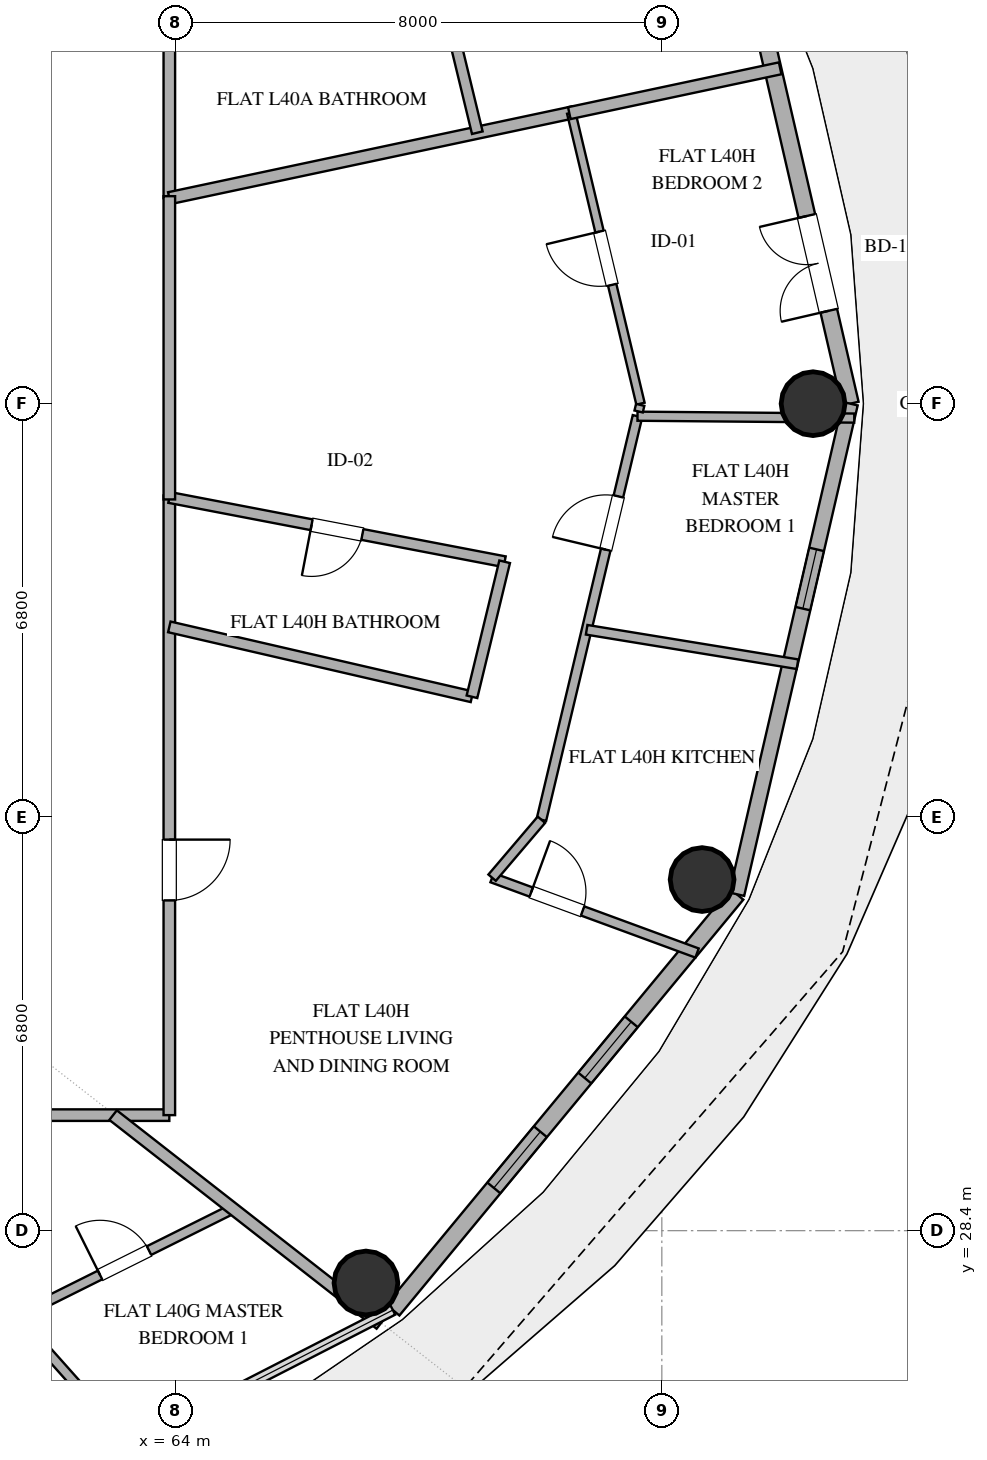
"""IFC4 building model, lengths in metres.
Left out: names, types, materials, properties, quantities, classifications, styles, units other than length and angle.
Written with IfcOpenShell. Run it as: python <this file> out.ifc"""

import sys

from ifc_helpers import new_model, si_unit, direction, frame, frame_2d, origin, origin_2d, place, context, subcontext, project, spatial, rectangle, hollow_circle, extrude, element, fill, save


model = new_model("IFC4")
c1 = context("Model", 3, precision=1e-05, world=origin(), true_north=direction((0.0, 1.0)))
c2 = subcontext(c1, "Body", "Model", "MODEL_VIEW")
j1 = project(units=[si_unit("LENGTHUNIT", "METRE"), si_unit("PLANEANGLEUNIT", "RADIAN")], contexts=[c1])
p1 = place(None, origin())
s1 = spatial("IfcSite", under=j1, at=p1, CompositionType="ELEMENT")
p2 = place(p1, origin())
s2 = spatial("IfcBuilding", under=s1, at=p2, CompositionType="ELEMENT")
p3 = place(p2, frame((0.0, 0.0, 161.4)))
s3 = spatial("IfcBuildingStorey", under=s2, at=p3, CompositionType="ELEMENT", Elevation=161.4)
for number, where, z_axis, x_axis in (
    (1, (74.487, 42.0, 0.0), (0.0, 0.0, 1.0), (1.0, 0.0, 0.0)),
    (2, (67.134, 27.54, 0.0), (0.0, 0.0, 1.0), (1.0, 0.0, 0.0)),
    (3, (72.662, 34.174, 0.0), (0.0, 0.0, 1.0), (1.0, 0.0, 0.0)),
):
    element("IfcColumn", number, at=place(p3, frame(where, z_axis=z_axis, x_axis=x_axis)), inside=s3, PredefinedType="COLUMN", context=c2, shape_type="SweptSolid", body=[
        extrude(hollow_circle(Radius=0.525, WallThickness=0.028, at=origin_2d()), origin(), (0.0, 0.0, 1.0), 3.38),
    ])
p4 = place(p3, frame((75.099, 42.0, 0.0), z_axis=(0.0, 0.0, 1.0), x_axis=(-0.225473184558, 0.974249374157, 0.0)))
e4 = element("IfcWall", 4, at=p4, inside=s3, PredefinedType="SOLIDWALL", context=c2, shape_type="SweptSolid", body=[
    extrude(rectangle(XDim=8.28, YDim=0.28, at=frame_2d((4.14, 0.0))), origin(), (0.0, 0.0, 1.0), 3.38),
])
p5 = place(p4, frame((1.568, 0.0, 0.0)))
e5 = element("IfcOpeningElement", 5, at=p5, cuts=e4, PredefinedType="OPENING", context=c2, shape_type="SweptSolid", body=[
    extrude(rectangle(XDim=1.6, YDim=2.25, at=frame_2d((0.8, 1.125))), frame((0.0, 0.15, 0.0), z_axis=(0.0, -1.0, 0.0), x_axis=(1.0, 0.0, 0.0)), (0.0, 0.0, 1.0), 0.3),
])
p6 = place(p3, frame((67.576, 27.094, 0.0), z_axis=(0.0, 0.0, 1.0), x_axis=(0.637333477683, 0.770588111915, 0.0)))
e6 = element("IfcWall", 6, at=p6, inside=s3, PredefinedType="SOLIDWALL", context=c2, shape_type="SweptSolid", body=[
    extrude(rectangle(XDim=8.875, YDim=0.28, at=frame_2d((4.438, 0.0))), origin(), (0.0, 0.0, 1.0), 3.38),
])
p7 = place(p6, frame((2.607, 0.0, 0.85)))
e7 = element("IfcOpeningElement", 7, at=p7, cuts=e6, PredefinedType="OPENING", context=c2, shape_type="SweptSolid", body=[
    extrude(rectangle(XDim=1.2, YDim=1.6, at=frame_2d((0.6, 0.8))), frame((0.0, 0.15, 0.0), z_axis=(0.0, -1.0, 0.0), x_axis=(1.0, 0.0, 0.0)), (0.0, 0.0, 1.0), 0.3),
])
p8 = place(p6, frame((4.952, 0.0, 0.85)))
e8 = element("IfcOpeningElement", 8, at=p8, cuts=e6, PredefinedType="OPENING", context=c2, shape_type="SweptSolid", body=[
    extrude(rectangle(XDim=1.2, YDim=1.6, at=frame_2d((0.6, 0.8))), frame((0.0, 0.15, 0.0), z_axis=(0.0, -1.0, 0.0), x_axis=(1.0, 0.0, 0.0)), (0.0, 0.0, 1.0), 0.3),
])
p9 = place(p3, frame((73.232, 33.933, 0.0), z_axis=(0.0, 0.0, 1.0), x_axis=(0.225473184558, 0.974249374157, 0.0)))
e9 = element("IfcWall", 9, at=p9, inside=s3, PredefinedType="SOLIDWALL", context=c2, shape_type="SweptSolid", body=[
    extrude(rectangle(XDim=8.28, YDim=0.25, at=frame_2d((4.14, 0.0))), origin(), (0.0, 0.0, 1.0), 3.38),
])
p10 = place(p9, frame((4.821, 0.0, 0.35)))
e10 = element("IfcOpeningElement", 10, at=p10, cuts=e9, PredefinedType="OPENING", context=c2, shape_type="SweptSolid", body=[
    extrude(rectangle(XDim=1.0, YDim=1.05, at=frame_2d((0.5, 0.525))), frame((0.0, 0.135, 0.0), z_axis=(0.0, -1.0, 0.0), x_axis=(1.0, 0.0, 0.0)), (0.0, 0.0, 1.0), 0.27),
])
p11 = place(p3, frame((63.9, 30.3, 0.0), z_axis=(0.0, 0.0, 1.0), x_axis=(-1.0, 0.0, 0.0)))
e11 = element("IfcWall", 11, at=p11, inside=s3, PredefinedType="PARTITIONING", context=c2, shape_type="SweptSolid", body=[
    extrude(rectangle(XDim=15.625, YDim=0.19, at=frame_2d((7.813, 0.0))), origin(), (0.0, 0.0, 1.0), 2.74),
])
p12 = place(p11, frame((6.137, 0.0, 0.0)))
e12 = element("IfcOpeningElement", 12, at=p12, cuts=e11, PredefinedType="OPENING", context=c2, shape_type="SweptSolid", body=[
    extrude(rectangle(XDim=1.0, YDim=2.2, at=frame_2d((0.5, 1.1))), frame((0.0, 0.105, 0.0), z_axis=(0.0, -1.0, 0.0), x_axis=(1.0, 0.0, 0.0)), (0.0, 0.0, 1.0), 0.21),
])
p13 = place(p3, frame((63.9, 40.49, 0.0), z_axis=(0.0, 0.0, 1.0), x_axis=(0.0, -1.0, 0.0)))
e13 = element("IfcWall", 13, at=p13, inside=s3, PredefinedType="PARTITIONING", context=c2, shape_type="SweptSolid", body=[
    extrude(rectangle(XDim=10.19, YDim=0.19, at=frame_2d((5.095, 0.0))), origin(), (0.0, 0.0, 1.0), 2.74),
])
p14 = place(p13, frame((5.659, 0.0, 0.0)))
e14 = element("IfcOpeningElement", 14, at=p14, cuts=e13, PredefinedType="OPENING", context=c2, shape_type="SweptSolid", body=[
    extrude(rectangle(XDim=1.0, YDim=2.2, at=frame_2d((0.5, 1.1))), frame((0.0, 0.105, 0.0), z_axis=(0.0, -1.0, 0.0), x_axis=(1.0, 0.0, 0.0)), (0.0, 0.0, 1.0), 0.21),
])
p15 = place(p3, frame((69.415, 39.4, 0.0), z_axis=(0.0, 0.0, 1.0), x_axis=(-0.98210492306, 0.188334596135, 0.0)))
e15 = element("IfcWall", 15, at=p15, inside=s3, PredefinedType="PLUMBINGWALL", context=c2, shape_type="SweptSolid", body=[
    extrude(rectangle(XDim=5.616, YDim=0.18, at=frame_2d((2.808, 0.0))), origin(), (0.0, 0.0, 1.0), 2.74),
])
p16 = place(p15, frame((2.383, 0.0, 0.0)))
e16 = element("IfcOpeningElement", 16, at=p16, cuts=e15, PredefinedType="OPENING", context=c2, shape_type="SweptSolid", body=[
    extrude(rectangle(XDim=0.85, YDim=2.1, at=frame_2d((0.425, 1.05))), frame((0.0, 0.1, 0.0), z_axis=(0.0, -1.0, 0.0), x_axis=(1.0, 0.0, 0.0)), (0.0, 0.0, 1.0), 0.2),
])
p17 = place(p3, frame((63.9, 53.7, 0.0), z_axis=(0.0, 0.0, 1.0), x_axis=(0.0, -1.0, 0.0)))
e17 = element("IfcWall", 17, at=p17, inside=s3, PredefinedType="PARTITIONING", context=c2, shape_type="SweptSolid", body=[
    extrude(rectangle(XDim=8.32, YDim=0.19, at=frame_2d((4.16, 0.0))), origin(), (0.0, 0.0, 1.0), 2.74),
])
p18 = place(p3, frame((63.9, 45.38, 0.0), z_axis=(0.0, 0.0, 1.0), x_axis=(0.978145779981, 0.207920256603, 0.0)))
e18 = element("IfcWall", 18, at=p18, inside=s3, PredefinedType="PARTITIONING", context=c2, shape_type="SweptSolid", body=[
    extrude(rectangle(XDim=6.789, YDim=0.2, at=frame_2d((3.395, 0.0))), origin(), (0.0, 0.0, 1.0), 2.74),
])
p19 = place(p3, frame((63.9, 38.329, 0.0), z_axis=(0.0, 0.0, 1.0), x_axis=(0.974377500084, -0.224918846098, 0.0)))
e19 = element("IfcWall", 19, at=p19, inside=s3, PredefinedType="PLUMBINGWALL", context=c2, shape_type="SweptSolid", body=[
    extrude(rectangle(XDim=5.108, YDim=0.18, at=frame_2d((2.554, 0.0))), origin(), (0.0, 0.0, 1.0), 2.74),
])
p20 = place(p3, frame((63.9, 45.412, 0.0), z_axis=(0.0, 0.0, 1.0), x_axis=(0.0, -1.0, 0.0)))
e20 = element("IfcWall", 20, at=p20, inside=s3, PredefinedType="PARTITIONING", context=c2, shape_type="SweptSolid", body=[
    extrude(rectangle(XDim=4.987, YDim=0.19, at=frame_2d((2.494, 0.0))), origin(), (0.0, 0.0, 1.0), 2.74),
])
p21 = place(p3, frame((71.649, 42.0, 0.0), z_axis=(0.0, 0.0, 1.0), x_axis=(-0.231622764326, 0.972805682059, 0.0)))
e21 = element("IfcWall", 21, at=p21, inside=s3, PredefinedType="PARTITIONING", context=c2, shape_type="SweptSolid", body=[
    extrude(rectangle(XDim=4.918, YDim=0.14, at=frame_2d((2.459, 0.0))), origin(), (0.0, 0.0, 1.0), 2.74),
])
p22 = place(p21, frame((2.009, 0.0, 0.0)))
e22 = element("IfcOpeningElement", 22, at=p22, cuts=e21, PredefinedType="OPENING", context=c2, shape_type="SweptSolid", body=[
    extrude(rectangle(XDim=0.9, YDim=2.1, at=frame_2d((0.45, 1.05))), frame((0.0, 0.08, 0.0), z_axis=(0.0, -1.0, 0.0), x_axis=(1.0, 0.0, 0.0)), (0.0, 0.0, 1.0), 0.16),
])
p23 = place(p3, frame((60.713, 26.65, 0.0), z_axis=(0.0, 0.0, 1.0), x_axis=(0.894932492822, 0.446201561283, 0.0)))
e23 = element("IfcWall", 23, at=p23, inside=s3, PredefinedType="PLUMBINGWALL", context=c2, shape_type="SweptSolid", body=[
    extrude(rectangle(XDim=4.729, YDim=0.16, at=frame_2d((2.365, 0.0))), origin(), (0.0, 0.0, 1.0), 2.74),
])
p24 = place(p23, frame((2.288, 0.0, 0.0)))
e24 = element("IfcOpeningElement", 24, at=p24, cuts=e23, PredefinedType="OPENING", context=c2, shape_type="SweptSolid", body=[
    extrude(rectangle(XDim=0.9, YDim=2.1, at=frame_2d((0.45, 1.05))), frame((0.0, 0.09, 0.0), z_axis=(0.0, -1.0, 0.0), x_axis=(1.0, 0.0, 0.0)), (0.0, 0.0, 1.0), 0.18),
])
p25 = place(p3, frame((70.019, 35.158, 0.0), z_axis=(0.0, 0.0, 1.0), x_axis=(0.231657621012, 0.972797382103, 0.0)))
e25 = element("IfcWall", 25, at=p25, inside=s3, PredefinedType="PLUMBINGWALL", context=c2, shape_type="SweptSolid", body=[
    extrude(rectangle(XDim=6.822, YDim=0.16, at=frame_2d((3.411, 0.0))), origin(), (0.0, 0.0, 1.0), 2.74),
])
p26 = place(p25, frame((4.567, 0.0, 0.0)))
e26 = element("IfcOpeningElement", 26, at=p26, cuts=e25, PredefinedType="OPENING", context=c2, shape_type="SweptSolid", body=[
    extrude(rectangle(XDim=0.9, YDim=2.1, at=frame_2d((0.45, 1.05))), frame((0.0, 0.09, 0.0), z_axis=(0.0, -1.0, 0.0), x_axis=(1.0, 0.0, 0.0)), (0.0, 0.0, 1.0), 0.18),
])
p27 = place(p3, frame((69.208, 34.205, 0.0), z_axis=(0.0, 0.0, 1.0), x_axis=(0.938602834346, -0.344999593272, 0.0)))
e27 = element("IfcWall", 27, at=p27, inside=s3, PredefinedType="PLUMBINGWALL", context=c2, shape_type="SweptSolid", body=[
    extrude(rectangle(XDim=3.591, YDim=0.16, at=frame_2d((1.796, 0.0))), origin(), (0.0, 0.0, 1.0), 2.74),
])
p28 = place(p27, frame((0.686, 0.0, 0.0)))
e28 = element("IfcOpeningElement", 28, at=p28, cuts=e27, PredefinedType="OPENING", context=c2, shape_type="SweptSolid", body=[
    extrude(rectangle(XDim=0.9, YDim=2.1, at=frame_2d((0.45, 1.05))), frame((0.0, 0.09, 0.0), z_axis=(0.0, -1.0, 0.0), x_axis=(1.0, 0.0, 0.0)), (0.0, 0.0, 1.0), 0.18),
])
p29 = place(p3, frame((75.165, 41.763, 0.0), z_axis=(0.0, 0.0, 1.0), x_axis=(-0.999962184605, 0.00869651424, 0.0)))
e29 = element("IfcWall", 29, at=p29, inside=s3, PredefinedType="PARTITIONING", context=c2, shape_type="SweptSolid", body=[
    extrude(rectangle(XDim=3.565, YDim=0.15, at=frame_2d((1.783, 0.0))), origin(), (0.0, 0.0, 1.0), 2.74),
])
p30 = place(p3, frame((73.946, 47.515, 0.0), z_axis=(0.0, 0.0, 1.0), x_axis=(-0.978135742848, -0.207967469966, 0.0)))
e30 = element("IfcWall", 30, at=p30, inside=s3, PredefinedType="PARTITIONING", context=c2, shape_type="SweptSolid", body=[
    extrude(rectangle(XDim=3.545, YDim=0.2, at=frame_2d((1.773, 0.0))), origin(), (0.0, 0.0, 1.0), 2.74),
])
p31 = place(p3, frame((74.231, 37.716, 0.0), z_axis=(0.0, 0.0, 1.0), x_axis=(-0.986918442879, 0.161220306117, 0.0)))
e31 = element("IfcWall", 31, at=p31, inside=s3, PredefinedType="PLUMBINGWALL", context=c2, shape_type="SweptSolid", body=[
    extrude(rectangle(XDim=3.513, YDim=0.16, at=frame_2d((1.757, 0.0))), origin(), (0.0, 0.0, 1.0), 2.74),
])
p32 = place(p3, frame((67.37, 26.866, 0.0), z_axis=(0.0, 0.0, 1.0), x_axis=(-0.788004464355, 0.615669525117, 0.0)))
e32 = element("IfcWall", 32, at=p32, inside=s3, PredefinedType="PARTITIONING", context=c2, shape_type="SweptSolid", body=[
    extrude(rectangle(XDim=5.577, YDim=0.2, at=frame_2d((2.789, 0.0))), origin(), (0.0, 0.0, 1.0), 2.74),
])
p33 = place(p3, frame((63.335, 24.79, 0.0), z_axis=(0.0, 0.0, 1.0), x_axis=(-0.665255741341, 0.746615562799, 0.0)))
e33 = element("IfcWall", 33, at=p33, inside=s3, PredefinedType="PLUMBINGWALL", context=c2, shape_type="SweptSolid", body=[
    extrude(rectangle(XDim=2.938, YDim=0.16, at=frame_2d((1.469, 0.0))), origin(), (0.0, 0.0, 1.0), 2.74),
])
p34 = place(p3, frame((68.877, 37.18, 0.0), z_axis=(0.0, 0.0, 1.0), x_axis=(0.235462364404, 0.971883467783, 0.0)))
e34 = element("IfcWall", 34, at=p34, inside=s3, PredefinedType="PLUMBINGWALL", context=c2, shape_type="SweptSolid", body=[
    extrude(rectangle(XDim=2.284, YDim=0.18, at=frame_2d((1.142, 0.0))), origin(), (0.0, 0.0, 1.0), 2.74),
])
p35 = place(p3, frame((68.965, 46.456, 0.0), z_axis=(0.0, 0.0, 1.0), x_axis=(-0.235442613623, 0.971888252676, 0.0)))
e35 = element("IfcWall", 35, at=p35, inside=s3, PredefinedType="PLUMBINGWALL", context=c2, shape_type="SweptSolid", body=[
    extrude(rectangle(XDim=1.865, YDim=0.18, at=frame_2d((0.932, 0.0))), origin(), (0.0, 0.0, 1.0), 2.74),
])
p36 = place(p3, frame((70.02, 35.158, 0.0), z_axis=(0.0, 0.0, 1.0), x_axis=(-0.648152333742, -0.761510703972, 0.0)))
e36 = element("IfcWall", 36, at=p36, inside=s3, PredefinedType="PLUMBINGWALL", context=c2, shape_type="SweptSolid", body=[
    extrude(rectangle(XDim=1.251, YDim=0.16, at=frame_2d((0.625, 0.0))), origin(), (0.0, 0.0, 1.0), 2.74),
])
p37 = place(p3, frame((71.618, 41.872, 0.0), z_axis=(0.0, 0.0, 1.0), x_axis=(0.233786115402, 0.972288050037, 0.0)))
e37 = element("IfcWall", 37, at=p37, inside=s3, PredefinedType="PARTITIONING", context=c2, shape_type="SweptSolid", body=[
    extrude(rectangle(XDim=0.112, YDim=0.14, at=frame_2d((0.056, 0.0))), origin(), (0.0, 0.0, 1.0), 2.74),
])
p38 = place(p5, origin())
e38 = element("IfcDoor", 38, at=p38, inside=s3, OperationType="DOUBLE_DOOR_SINGLE_SWING", PredefinedType="DOOR", context=c2, shape_type="SweptSolid", body=[
    extrude(rectangle(XDim=1.6, YDim=2.25, at=frame_2d((0.8, 1.125))), frame((0.0, 0.025, 0.0), z_axis=(0.0, -1.0, 0.0), x_axis=(1.0, 0.0, 0.0)), (0.0, 0.0, 1.0), 0.05),
])
fill(e5, e38)
p39 = place(p7, origin())
e39 = element("IfcWindow", 39, at=p39, inside=s3, PartitioningType="SINGLE_PANEL", PredefinedType="WINDOW", context=c2, shape_type="SweptSolid", body=[
    extrude(rectangle(XDim=1.2, YDim=1.6, at=frame_2d((0.6, 0.8))), frame((0.0, 0.03, 0.0), z_axis=(0.0, -1.0, 0.0), x_axis=(1.0, 0.0, 0.0)), (0.0, 0.0, 1.0), 0.06),
])
fill(e7, e39)
p40 = place(p8, origin())
e40 = element("IfcWindow", 40, at=p40, inside=s3, PartitioningType="SINGLE_PANEL", PredefinedType="WINDOW", context=c2, shape_type="SweptSolid", body=[
    extrude(rectangle(XDim=1.2, YDim=1.6, at=frame_2d((0.6, 0.8))), frame((0.0, 0.03, 0.0), z_axis=(0.0, -1.0, 0.0), x_axis=(1.0, 0.0, 0.0)), (0.0, 0.0, 1.0), 0.06),
])
fill(e8, e40)
p41 = place(p10, origin())
e41 = element("IfcWindow", 41, at=p41, inside=s3, PartitioningType="SINGLE_PANEL", PredefinedType="WINDOW", context=c2, shape_type="SweptSolid", body=[
    extrude(rectangle(XDim=1.0, YDim=1.05, at=frame_2d((0.5, 0.525))), frame((0.0, 0.03, 0.0), z_axis=(0.0, -1.0, 0.0), x_axis=(1.0, 0.0, 0.0)), (0.0, 0.0, 1.0), 0.06),
])
fill(e10, e41)
p42 = place(p14, origin())
e42 = element("IfcDoor", 42, at=p42, inside=s3, OperationType="SINGLE_SWING_LEFT", PredefinedType="DOOR", context=c2, shape_type="SweptSolid", body=[
    extrude(rectangle(XDim=1.0, YDim=2.2, at=frame_2d((0.5, 1.1))), frame((0.0, 0.025, 0.0), z_axis=(0.0, -1.0, 0.0), x_axis=(1.0, 0.0, 0.0)), (0.0, 0.0, 1.0), 0.05),
])
fill(e14, e42)
p43 = place(p16, origin())
e43 = element("IfcDoor", 43, at=p43, inside=s3, OperationType="SINGLE_SWING_RIGHT", PredefinedType="DOOR", context=c2, shape_type="SweptSolid", body=[
    extrude(rectangle(XDim=0.85, YDim=2.1, at=frame_2d((0.425, 1.05))), frame((0.0, 0.025, 0.0), z_axis=(0.0, -1.0, 0.0), x_axis=(1.0, 0.0, 0.0)), (0.0, 0.0, 1.0), 0.05),
])
fill(e16, e43)
p44 = place(p22, origin())
e44 = element("IfcDoor", 44, at=p44, inside=s3, OperationType="SINGLE_SWING_RIGHT", PredefinedType="DOOR", context=c2, shape_type="SweptSolid", body=[
    extrude(rectangle(XDim=0.9, YDim=2.1, at=frame_2d((0.45, 1.05))), frame((0.0, 0.025, 0.0), z_axis=(0.0, -1.0, 0.0), x_axis=(1.0, 0.0, 0.0)), (0.0, 0.0, 1.0), 0.05),
])
fill(e22, e44)
p45 = place(p24, origin())
e45 = element("IfcDoor", 45, at=p45, inside=s3, OperationType="SINGLE_SWING_LEFT", PredefinedType="DOOR", context=c2, shape_type="SweptSolid", body=[
    extrude(rectangle(XDim=0.9, YDim=2.1, at=frame_2d((0.45, 1.05))), frame((0.0, 0.025, 0.0), z_axis=(0.0, -1.0, 0.0), x_axis=(1.0, 0.0, 0.0)), (0.0, 0.0, 1.0), 0.05),
])
fill(e24, e45)
p46 = place(p26, origin())
e46 = element("IfcDoor", 46, at=p46, inside=s3, OperationType="SINGLE_SWING_LEFT", PredefinedType="DOOR", context=c2, shape_type="SweptSolid", body=[
    extrude(rectangle(XDim=0.9, YDim=2.1, at=frame_2d((0.45, 1.05))), frame((0.0, 0.025, 0.0), z_axis=(0.0, -1.0, 0.0), x_axis=(1.0, 0.0, 0.0)), (0.0, 0.0, 1.0), 0.05),
])
fill(e26, e46)
p47 = place(p28, origin())
e47 = element("IfcDoor", 47, at=p47, inside=s3, OperationType="SINGLE_SWING_LEFT", PredefinedType="DOOR", context=c2, shape_type="SweptSolid", body=[
    extrude(rectangle(XDim=0.9, YDim=2.1, at=frame_2d((0.45, 1.05))), frame((0.0, 0.025, 0.0), z_axis=(0.0, -1.0, 0.0), x_axis=(1.0, 0.0, 0.0)), (0.0, 0.0, 1.0), 0.05),
])
fill(e28, e47)
save(model, sys.argv[1])
